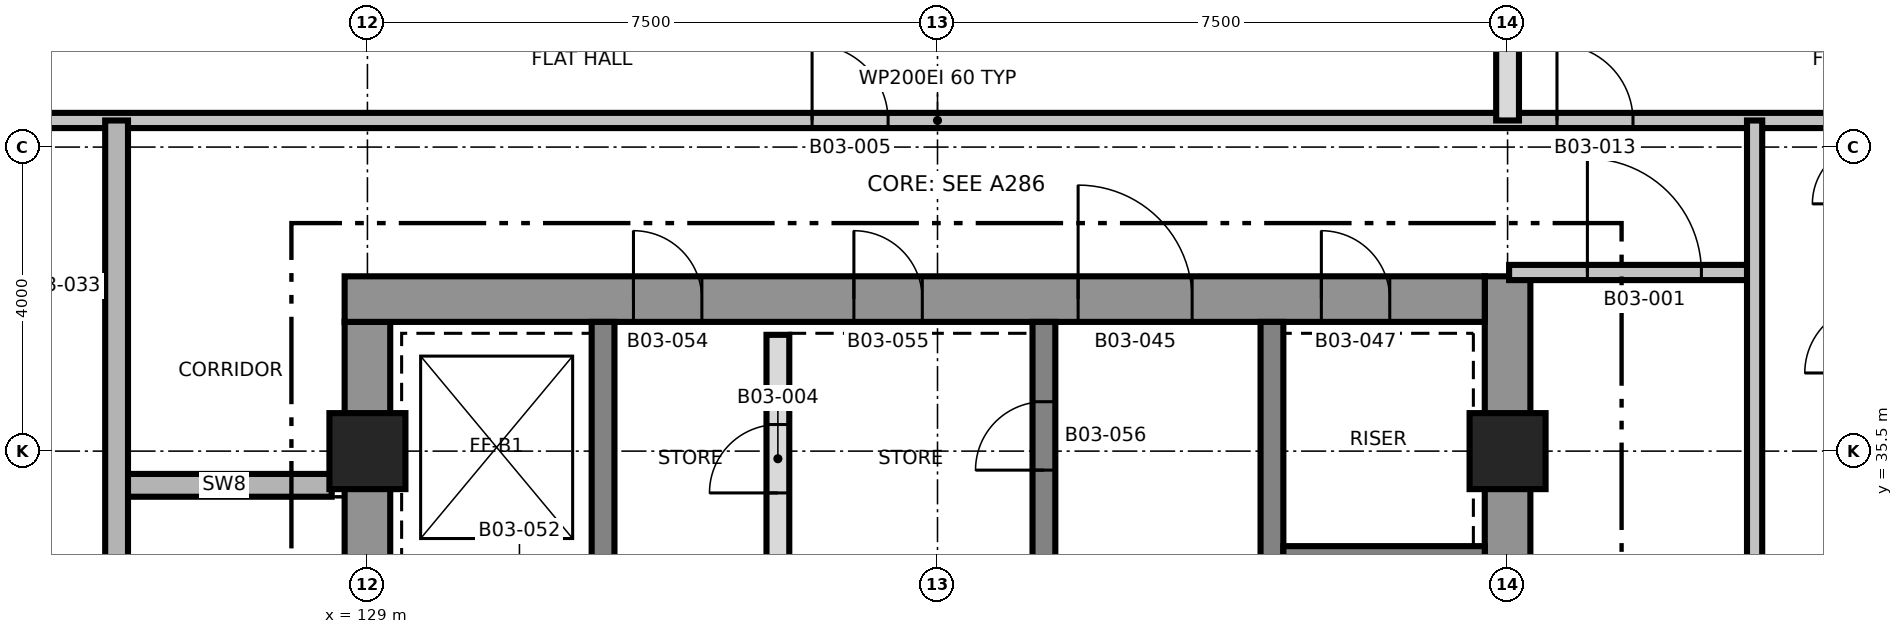
"""IFC4 building model, lengths in metres.
Left out: names, types, materials, properties, quantities, classifications, styles, units other than length and angle.
Written with IfcOpenShell. Run it as: python <this file> out.ifc"""

import sys

from ifc_helpers import new_model, si_unit, direction, frame, frame_2d, origin, origin_2d, place, context, subcontext, project, spatial, rectangle, extrude, element, fill, save


model = new_model("IFC4")
c1 = context("Model", 3, precision=1e-05, world=origin(), true_north=direction((0.0, 1.0)))
c2 = subcontext(c1, "Body", "Model", "MODEL_VIEW")
j1 = project(units=[si_unit("LENGTHUNIT", "METRE"), si_unit("PLANEANGLEUNIT", "RADIAN")], contexts=[c1])
p1 = place(None, origin())
s1 = spatial("IfcSite", under=j1, at=p1, CompositionType="ELEMENT")
p2 = place(p1, origin())
s2 = spatial("IfcBuilding", under=s1, at=p2, CompositionType="ELEMENT")
p3 = place(p2, frame((0.0, 0.0, 55.7)))
s3 = spatial("IfcBuildingStorey", under=s2, at=p3, CompositionType="ELEMENT", Elevation=55.7)
p4 = place(p3, frame((129.0, 24.8, 0.0), z_axis=(0.0, 0.0, 1.0), x_axis=(0.0, 1.0, 0.0)))
e1 = element("IfcWall", 1, at=p4, inside=s3, PredefinedType="SHEAR", context=c2, shape_type="SweptSolid", body=[
    extrude(rectangle(XDim=12.4, YDim=0.6, at=frame_2d((6.2, 0.0))), origin(), (0.0, 0.0, 1.0), 3.7),
])
p5 = place(p4, frame((5.15, 0.0, 0.0)))
e2 = element("IfcOpeningElement", 2, at=p5, cuts=e1, PredefinedType="OPENING", context=c2, shape_type="SweptSolid", body=[
    extrude(rectangle(XDim=1.0, YDim=2.1, at=frame_2d((0.5, 1.05))), frame((0.0, 0.31, 0.0), z_axis=(0.0, -1.0, 0.0), x_axis=(1.0, 0.0, 0.0)), (0.0, 0.0, 1.0), 0.62),
])
p6 = place(p3, frame((144.0, 24.2, 0.0), z_axis=(0.0, 0.0, 1.0), x_axis=(0.0, 1.0, 0.0)))
e3 = element("IfcWall", 3, at=p6, inside=s3, PredefinedType="SHEAR", context=c2, shape_type="SweptSolid", body=[
    extrude(rectangle(XDim=13.6, YDim=0.6, at=frame_2d((6.8, 0.0))), origin(), (0.0, 0.0, 1.0), 3.7),
])
p7 = place(p3, frame((128.7, 37.5, 0.0), z_axis=(0.0, 0.0, 1.0), x_axis=(1.0, 0.0, 0.0)))
e4 = element("IfcWall", 4, at=p7, inside=s3, PredefinedType="SHEAR", context=c2, shape_type="SweptSolid", body=[
    extrude(rectangle(XDim=15.0, YDim=0.6, at=frame_2d((7.5, 0.0))), origin(), (0.0, 0.0, 1.0), 3.7),
])
p8 = place(p7, frame((9.65, 0.0, 0.0)))
e5 = element("IfcOpeningElement", 5, at=p8, cuts=e4, PredefinedType="OPENING", context=c2, shape_type="SweptSolid", body=[
    extrude(rectangle(XDim=1.5, YDim=2.1, at=frame_2d((0.75, 1.05))), frame((0.0, 0.31, 0.0), z_axis=(0.0, -1.0, 0.0), x_axis=(1.0, 0.0, 0.0)), (0.0, 0.0, 1.0), 0.62),
])
p9 = place(p7, frame((12.85, 0.0, 0.0)))
e6 = element("IfcOpeningElement", 6, at=p9, cuts=e4, PredefinedType="OPENING", context=c2, shape_type="SweptSolid", body=[
    extrude(rectangle(XDim=0.9, YDim=2.1, at=frame_2d((0.45, 1.05))), frame((0.0, 0.31, 0.0), z_axis=(0.0, -1.0, 0.0), x_axis=(1.0, 0.0, 0.0)), (0.0, 0.0, 1.0), 0.62),
])
p10 = place(p7, frame((3.8, 0.0, 0.0)))
e7 = element("IfcOpeningElement", 7, at=p10, cuts=e4, PredefinedType="OPENING", context=c2, shape_type="SweptSolid", body=[
    extrude(rectangle(XDim=0.9, YDim=2.1, at=frame_2d((0.45, 1.05))), frame((0.0, 0.31, 0.0), z_axis=(0.0, -1.0, 0.0), x_axis=(1.0, 0.0, 0.0)), (0.0, 0.0, 1.0), 0.62),
])
p11 = place(p7, frame((6.7, 0.0, 0.0)))
e8 = element("IfcOpeningElement", 8, at=p11, cuts=e4, PredefinedType="OPENING", context=c2, shape_type="SweptSolid", body=[
    extrude(rectangle(XDim=0.9, YDim=2.1, at=frame_2d((0.45, 1.05))), frame((0.0, 0.31, 0.0), z_axis=(0.0, -1.0, 0.0), x_axis=(1.0, 0.0, 0.0)), (0.0, 0.0, 1.0), 0.62),
])
p12 = place(p3, frame((132.1, 24.8, 0.0), z_axis=(0.0, 0.0, 1.0), x_axis=(0.0, 1.0, 0.0)))
e9 = element("IfcWall", 9, at=p12, inside=s3, PredefinedType="SHEAR", context=c2, shape_type="SweptSolid", body=[
    extrude(rectangle(XDim=12.4, YDim=0.3, at=frame_2d((6.2, 0.0))), origin(), (0.0, 0.0, 1.0), 3.7),
])
p13 = place(p12, frame((3.9, 0.0, 0.0)))
e10 = element("IfcOpeningElement", 10, at=p13, cuts=e9, PredefinedType="OPENING", context=c2, shape_type="SweptSolid", body=[
    extrude(rectangle(XDim=1.2, YDim=2.1, at=frame_2d((0.6, 1.05))), frame((0.0, 0.16, 0.0), z_axis=(0.0, -1.0, 0.0), x_axis=(1.0, 0.0, 0.0)), (0.0, 0.0, 1.0), 0.32),
])
p14 = place(p3, frame((137.9, 24.8, 0.0), z_axis=(0.0, 0.0, 1.0), x_axis=(0.0, 1.0, 0.0)))
e11 = element("IfcWall", 11, at=p14, inside=s3, PredefinedType="SHEAR", context=c2, shape_type="SweptSolid", body=[
    extrude(rectangle(XDim=12.4, YDim=0.3, at=frame_2d((6.2, 0.0))), origin(), (0.0, 0.0, 1.0), 3.7),
])
p15 = place(p14, frame((3.95, 0.0, 0.0)))
e12 = element("IfcOpeningElement", 12, at=p15, cuts=e11, PredefinedType="OPENING", context=c2, shape_type="SweptSolid", body=[
    extrude(rectangle(XDim=1.5, YDim=2.1, at=frame_2d((0.75, 1.05))), frame((0.0, 0.16, 0.0), z_axis=(0.0, -1.0, 0.0), x_axis=(1.0, 0.0, 0.0)), (0.0, 0.0, 1.0), 0.32),
])
p16 = place(p14, frame((10.45, 0.0, 0.0)))
e13 = element("IfcOpeningElement", 13, at=p16, cuts=e11, PredefinedType="OPENING", context=c2, shape_type="SweptSolid", body=[
    extrude(rectangle(XDim=0.9, YDim=2.1, at=frame_2d((0.45, 1.05))), frame((0.0, 0.16, 0.0), z_axis=(0.0, -1.0, 0.0), x_axis=(1.0, 0.0, 0.0)), (0.0, 0.0, 1.0), 0.32),
])
p17 = place(p3, frame((140.9, 24.8, 0.0), z_axis=(0.0, 0.0, 1.0), x_axis=(0.0, 1.0, 0.0)))
e14 = element("IfcWall", 14, at=p17, inside=s3, PredefinedType="SHEAR", context=c2, shape_type="SweptSolid", body=[
    extrude(rectangle(XDim=12.4, YDim=0.3, at=frame_2d((6.2, 0.0))), origin(), (0.0, 0.0, 1.0), 3.7),
])
p18 = place(p17, frame((5.9, 0.0, 0.0)))
e15 = element("IfcOpeningElement", 15, at=p18, cuts=e14, PredefinedType="OPENING", context=c2, shape_type="SweptSolid", body=[
    extrude(rectangle(XDim=1.2, YDim=2.1, at=frame_2d((0.6, 1.05))), frame((0.0, 0.16, 0.0), z_axis=(0.0, -1.0, 0.0), x_axis=(1.0, 0.0, 0.0)), (0.0, 0.0, 1.0), 0.32),
])
p19 = place(p3, frame((141.05, 34.1, 0.0), z_axis=(0.0, 0.0, 1.0), x_axis=(1.0, 0.0, 0.0)))
e16 = element("IfcWall", 16, at=p19, inside=s3, PredefinedType="SHEAR", context=c2, shape_type="SweptSolid", body=[
    extrude(rectangle(XDim=2.65, YDim=0.3, at=frame_2d((1.325, 0.0))), origin(), (0.0, 0.0, 1.0), 3.7),
])
for number, where, z_axis, x_axis in (
    (17, (129.0, 35.5, 0.0), (0.0, 0.0, 1.0), (1.0, 0.0, 0.0)),
    (18, (144.0, 35.5, 0.0), (0.0, 0.0, 1.0), (1.0, 0.0, 0.0)),
):
    element("IfcColumn", number, at=place(p3, frame(where, z_axis=z_axis, x_axis=x_axis)), inside=s3, PredefinedType="COLUMN", context=c2, shape_type="SweptSolid", body=[
        extrude(rectangle(XDim=1.0, YDim=1.0, at=origin_2d()), origin(), (0.0, 0.0, 1.0), 3.7),
    ])
p20 = place(p3, frame((125.7, 35.05, 0.0), z_axis=(0.0, 0.0, 1.0), x_axis=(1.0, 0.0, 0.0)))
e19 = element("IfcWall", 19, at=p20, inside=s3, PredefinedType="SHEAR", context=c2, shape_type="SweptSolid", body=[
    extrude(rectangle(XDim=2.83, YDim=0.3, at=frame_2d((1.415, 0.0))), origin(), (0.0, 0.0, 1.0), 3.4),
])
p21 = place(p3, frame((144.02, 37.85, 0.0), z_axis=(0.0, 0.0, 1.0), x_axis=(1.0, 0.0, 0.0)))
e20 = element("IfcWall", 20, at=p21, inside=s3, PredefinedType="PARTITIONING", context=c2, shape_type="SweptSolid", body=[
    extrude(rectangle(XDim=3.23, YDim=0.2, at=frame_2d((1.615, 0.0))), origin(), (0.0, 0.0, 1.0), 3.4),
])
p22 = place(p21, frame((1.03, 0.0, 0.0)))
e21 = element("IfcOpeningElement", 21, at=p22, cuts=e20, PredefinedType="OPENING", context=c2, shape_type="SweptSolid", body=[
    extrude(rectangle(XDim=1.5, YDim=2.1, at=frame_2d((0.75, 1.05))), frame((0.0, 0.11, 0.0), z_axis=(0.0, -1.0, 0.0), x_axis=(1.0, 0.0, 0.0)), (0.0, 0.0, 1.0), 0.22),
])
p23 = place(p3, frame((119.58, 39.85, 0.0), z_axis=(0.0, 0.0, 1.0), x_axis=(1.0, 0.0, 0.0)))
e22 = element("IfcWall", 22, at=p23, inside=s3, PredefinedType="PARTITIONING", context=c2, shape_type="SweptSolid", body=[
    extrude(rectangle(XDim=33.84, YDim=0.2, at=frame_2d((16.92, 0.0))), origin(), (0.0, 0.0, 1.0), 3.4),
])
p24 = place(p23, frame((15.27, 0.0, 0.0)))
e23 = element("IfcOpeningElement", 23, at=p24, cuts=e22, PredefinedType="OPENING", context=c2, shape_type="SweptSolid", body=[
    extrude(rectangle(XDim=1.0, YDim=2.1, at=frame_2d((0.5, 1.05))), frame((0.0, 0.11, 0.0), z_axis=(0.0, -1.0, 0.0), x_axis=(1.0, 0.0, 0.0)), (0.0, 0.0, 1.0), 0.22),
])
p25 = place(p23, frame((25.07, 0.0, 0.0)))
e24 = element("IfcOpeningElement", 24, at=p25, cuts=e22, PredefinedType="OPENING", context=c2, shape_type="SweptSolid", body=[
    extrude(rectangle(XDim=1.0, YDim=2.1, at=frame_2d((0.5, 1.05))), frame((0.0, 0.11, 0.0), z_axis=(0.0, -1.0, 0.0), x_axis=(1.0, 0.0, 0.0)), (0.0, 0.0, 1.0), 0.22),
])
p26 = place(p3, frame((125.7, 22.15, 0.0), z_axis=(0.0, 0.0, 1.0), x_axis=(0.0, 1.0, 0.0)))
e25 = element("IfcWall", 25, at=p26, inside=s3, PredefinedType="SHEAR", context=c2, shape_type="SweptSolid", body=[
    extrude(rectangle(XDim=17.7, YDim=0.3, at=frame_2d((8.85, 0.0))), origin(), (0.0, 0.0, 1.0), 3.4),
])
p27 = place(p26, frame((2.7, 0.0, 0.0)))
e26 = element("IfcOpeningElement", 26, at=p27, cuts=e25, PredefinedType="OPENING", context=c2, shape_type="SweptSolid", body=[
    extrude(rectangle(XDim=1.0, YDim=2.1, at=frame_2d((0.5, 1.05))), frame((0.0, 0.16, 0.0), z_axis=(0.0, -1.0, 0.0), x_axis=(1.0, 0.0, 0.0)), (0.0, 0.0, 1.0), 0.32),
])
p28 = place(p3, frame((134.4, 33.77, 0.0), z_axis=(0.0, 0.0, 1.0), x_axis=(0.0, 1.0, 0.0)))
e27 = element("IfcWall", 27, at=p28, inside=s3, PredefinedType="PARTITIONING", context=c2, shape_type="SweptSolid", body=[
    extrude(rectangle(XDim=3.26, YDim=0.3, at=frame_2d((1.63, 0.0))), origin(), (0.0, 0.0, 1.0), 3.4),
])
p29 = place(p28, frame((1.18, 0.0, 0.0)))
e28 = element("IfcOpeningElement", 28, at=p29, cuts=e27, PredefinedType="OPENING", context=c2, shape_type="SweptSolid", body=[
    extrude(rectangle(XDim=0.9, YDim=2.1, at=frame_2d((0.45, 1.05))), frame((0.0, 0.16, 0.0), z_axis=(0.0, -1.0, 0.0), x_axis=(1.0, 0.0, 0.0)), (0.0, 0.0, 1.0), 0.32),
])
p30 = place(p3, frame((144.0, 39.85, 0.0), z_axis=(0.0, 0.0, 1.0), x_axis=(0.0, 1.0, 0.0)))
e29 = element("IfcWall", 29, at=p30, inside=s3, PredefinedType="PARTITIONING", context=c2, shape_type="SweptSolid", body=[
    extrude(rectangle(XDim=6.57, YDim=0.3, at=frame_2d((3.285, 0.0))), origin(), (0.0, 0.0, 1.0), 3.4),
])
p31 = place(p3, frame((147.25, 22.15, 0.0), z_axis=(0.0, 0.0, 1.0), x_axis=(0.0, 1.0, 0.0)))
e30 = element("IfcWall", 30, at=p31, inside=s3, PredefinedType="PARTITIONING", context=c2, shape_type="SweptSolid", body=[
    extrude(rectangle(XDim=17.7, YDim=0.2, at=frame_2d((8.85, 0.0))), origin(), (0.0, 0.0, 1.0), 3.4),
])
p32 = place(p31, frame((2.65, 0.0, 0.0)))
e31 = element("IfcOpeningElement", 31, at=p32, cuts=e30, PredefinedType="OPENING", context=c2, shape_type="SweptSolid", body=[
    extrude(rectangle(XDim=1.0, YDim=2.1, at=frame_2d((0.5, 1.05))), frame((0.0, 0.11, 0.0), z_axis=(0.0, -1.0, 0.0), x_axis=(1.0, 0.0, 0.0)), (0.0, 0.0, 1.0), 0.22),
])
p33 = place(p22, origin())
e32 = element("IfcDoor", 32, at=p33, inside=s3, OperationType="SINGLE_SWING_LEFT", PredefinedType="DOOR", context=c2, shape_type="SweptSolid", body=[
    extrude(rectangle(XDim=1.5, YDim=2.1, at=frame_2d((0.75, 1.05))), frame((0.0, 0.025, 0.0), z_axis=(0.0, -1.0, 0.0), x_axis=(1.0, 0.0, 0.0)), (0.0, 0.0, 1.0), 0.05),
])
fill(e21, e32)
p34 = place(p29, origin())
e33 = element("IfcDoor", 33, at=p34, inside=s3, OperationType="SINGLE_SWING_RIGHT", PredefinedType="DOOR", context=c2, shape_type="SweptSolid", body=[
    extrude(rectangle(XDim=0.9, YDim=2.1, at=frame_2d((0.45, 1.05))), frame((0.0, 0.025, 0.0), z_axis=(0.0, -1.0, 0.0), x_axis=(1.0, 0.0, 0.0)), (0.0, 0.0, 1.0), 0.05),
])
fill(e28, e33)
p35 = place(p24, origin())
e34 = element("IfcDoor", 34, at=p35, inside=s3, OperationType="SINGLE_SWING_LEFT", PredefinedType="DOOR", context=c2, shape_type="SweptSolid", body=[
    extrude(rectangle(XDim=1.0, YDim=2.1, at=frame_2d((0.5, 1.05))), frame((0.0, 0.025, 0.0), z_axis=(0.0, -1.0, 0.0), x_axis=(1.0, 0.0, 0.0)), (0.0, 0.0, 1.0), 0.05),
])
fill(e23, e34)
p36 = place(p25, origin())
e35 = element("IfcDoor", 35, at=p36, inside=s3, OperationType="SINGLE_SWING_LEFT", PredefinedType="DOOR", context=c2, shape_type="SweptSolid", body=[
    extrude(rectangle(XDim=1.0, YDim=2.1, at=frame_2d((0.5, 1.05))), frame((0.0, 0.025, 0.0), z_axis=(0.0, -1.0, 0.0), x_axis=(1.0, 0.0, 0.0)), (0.0, 0.0, 1.0), 0.05),
])
fill(e24, e35)
p37 = place(p8, origin())
e36 = element("IfcDoor", 36, at=p37, inside=s3, OperationType="SINGLE_SWING_RIGHT", PredefinedType="DOOR", context=c2, shape_type="SweptSolid", body=[
    extrude(rectangle(XDim=1.5, YDim=2.1, at=frame_2d((0.75, 1.05))), frame((0.0, 0.025, 0.0), z_axis=(0.0, -1.0, 0.0), x_axis=(1.0, 0.0, 0.0)), (0.0, 0.0, 1.0), 0.05),
])
fill(e5, e36)
p38 = place(p9, origin())
e37 = element("IfcDoor", 37, at=p38, inside=s3, OperationType="SINGLE_SWING_RIGHT", PredefinedType="DOOR", context=c2, shape_type="SweptSolid", body=[
    extrude(rectangle(XDim=0.9, YDim=2.1, at=frame_2d((0.45, 1.05))), frame((0.0, 0.025, 0.0), z_axis=(0.0, -1.0, 0.0), x_axis=(1.0, 0.0, 0.0)), (0.0, 0.0, 1.0), 0.05),
])
fill(e6, e37)
p39 = place(p10, origin())
e38 = element("IfcDoor", 38, at=p39, inside=s3, OperationType="SINGLE_SWING_LEFT", PredefinedType="DOOR", context=c2, shape_type="SweptSolid", body=[
    extrude(rectangle(XDim=0.9, YDim=2.1, at=frame_2d((0.45, 1.05))), frame((0.0, 0.025, 0.0), z_axis=(0.0, -1.0, 0.0), x_axis=(1.0, 0.0, 0.0)), (0.0, 0.0, 1.0), 0.05),
])
fill(e7, e38)
p40 = place(p11, origin())
e39 = element("IfcDoor", 39, at=p40, inside=s3, OperationType="SINGLE_SWING_RIGHT", PredefinedType="DOOR", context=c2, shape_type="SweptSolid", body=[
    extrude(rectangle(XDim=0.9, YDim=2.1, at=frame_2d((0.45, 1.05))), frame((0.0, 0.025, 0.0), z_axis=(0.0, -1.0, 0.0), x_axis=(1.0, 0.0, 0.0)), (0.0, 0.0, 1.0), 0.05),
])
fill(e8, e39)
p41 = place(p16, origin())
e40 = element("IfcDoor", 40, at=p41, inside=s3, OperationType="SINGLE_SWING_RIGHT", PredefinedType="DOOR", context=c2, shape_type="SweptSolid", body=[
    extrude(rectangle(XDim=0.9, YDim=2.1, at=frame_2d((0.45, 1.05))), frame((0.0, 0.025, 0.0), z_axis=(0.0, -1.0, 0.0), x_axis=(1.0, 0.0, 0.0)), (0.0, 0.0, 1.0), 0.05),
])
fill(e13, e40)
save(model, sys.argv[1])
